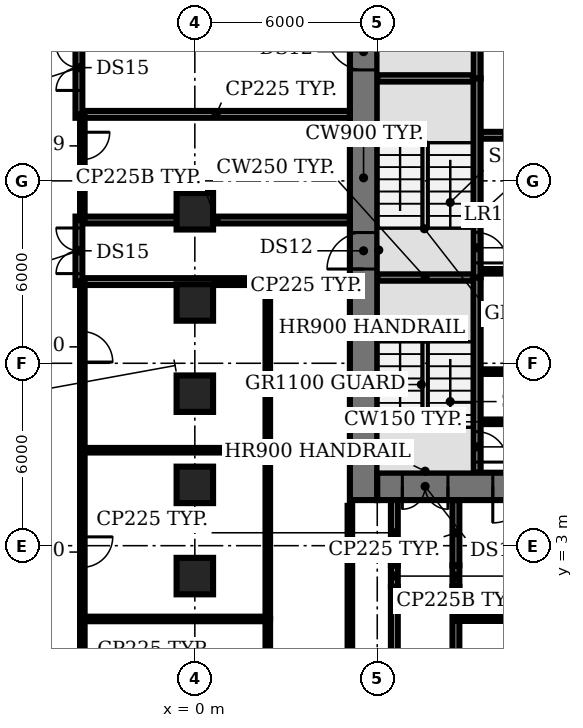
"""IFC4 building model, lengths in metres.
Left out: names, types, materials, properties, quantities, classifications, styles, units other than length and angle.
Written with IfcOpenShell. Run it as: python <this file> out.ifc"""

import sys

from ifc_helpers import new_model, si_unit, direction, frame, frame_2d, origin, origin_2d, place, context, subcontext, project, spatial, rectangle, extrude, element, fill, save


model = new_model("IFC4")
c1 = context("Model", 3, precision=1e-05, world=origin(), true_north=direction((0.0, 1.0)))
c2 = subcontext(c1, "Body", "Model", "MODEL_VIEW")
j1 = project(units=[si_unit("LENGTHUNIT", "METRE"), si_unit("PLANEANGLEUNIT", "RADIAN")], contexts=[c1])
p1 = place(None, origin())
s1 = spatial("IfcSite", under=j1, at=p1, CompositionType="ELEMENT")
p2 = place(p1, origin())
s2 = spatial("IfcBuilding", under=s1, at=p2, CompositionType="ELEMENT")
p3 = place(p2, origin())
s3 = spatial("IfcBuildingStorey", under=s2, at=p3, CompositionType="ELEMENT", Elevation=0.0)
for number, where, z_axis, x_axis in (
    (1, (0.0, 2.0, 0.0), (0.0, 0.0, 1.0), (1.0, 0.0, 0.0)),
    (2, (0.0, 5.0, 0.0), (0.0, 0.0, 1.0), (1.0, 0.0, 0.0)),
    (3, (0.0, 8.0, 0.0), (0.0, 0.0, 1.0), (1.0, 0.0, 0.0)),
    (4, (0.0, 11.0, 0.0), (0.0, 0.0, 1.0), (1.0, 0.0, 0.0)),
    (5, (0.0, 14.0, 0.0), (0.0, 0.0, 1.0), (1.0, 0.0, 0.0)),
):
    element("IfcColumn", number, at=place(p3, frame(where, z_axis=z_axis, x_axis=x_axis)), inside=s3, PredefinedType="COLUMN", context=c2, shape_type="SweptSolid", body=[
        extrude(rectangle(XDim=1.2, YDim=1.2, at=origin_2d()), origin(), (0.0, 0.0, 1.0), 5.65),
    ])
for number, where, z_axis, x_axis in (
    (6, (9.4, 7.075, 0.0), (0.0, 0.0, 1.0), (1.0, 0.0, 0.0)),
    (7, (9.4, 8.725, 0.0), (0.0, 0.0, 1.0), (1.0, 0.0, 0.0)),
    (8, (9.4, 10.375, 0.0), (0.0, 0.0, 1.0), (1.0, 0.0, 0.0)),
):
    element("IfcWall", number, at=place(p3, frame(where, z_axis=z_axis, x_axis=x_axis)), inside=s3, PredefinedType="SHEAR", context=c2, shape_type="SweptSolid", body=[
        extrude(rectangle(XDim=1.05, YDim=0.15, at=frame_2d((0.525, 0.0))), origin(), (0.0, 0.0, 1.0), 5.65),
    ])
p4 = place(p3, frame((6.0, 11.825, 0.0), z_axis=(0.0, 0.0, 1.0), x_axis=(1.0, 0.0, 0.0)))
e9 = element("IfcWall", 9, at=p4, inside=s3, PredefinedType="SHEAR", context=c2, shape_type="SweptSolid", body=[
    extrude(rectangle(XDim=3.15, YDim=0.25, at=frame_2d((1.575, 0.0))), origin(), (0.0, 0.0, 1.0), 5.65),
])
p5 = place(p3, frame((9.4, 12.025, 0.0), z_axis=(0.0, 0.0, 1.0), x_axis=(1.0, 0.0, 0.0)))
e10 = element("IfcWall", 10, at=p5, inside=s3, PredefinedType="SHEAR", context=c2, shape_type="SweptSolid", body=[
    extrude(rectangle(XDim=1.05, YDim=0.15, at=frame_2d((0.525, 0.0))), origin(), (0.0, 0.0, 1.0), 5.65),
])
p6 = place(p3, frame((9.4, 13.7, 0.0), z_axis=(0.0, 0.0, 1.0), x_axis=(1.0, 0.0, 0.0)))
e11 = element("IfcWall", 11, at=p6, inside=s3, PredefinedType="PARTITIONING", context=c2, shape_type="SweptSolid", body=[
    extrude(rectangle(XDim=4.0, YDim=0.225, at=frame_2d((2.0, 0.0))), origin(), (0.0, 0.0, 1.0), 5.65),
])
p7 = place(p3, frame((9.4, 16.5, 0.0), z_axis=(0.0, 0.0, 1.0), x_axis=(1.0, 0.0, 0.0)))
e12 = element("IfcWall", 12, at=p7, inside=s3, PredefinedType="PARTITIONING", context=c2, shape_type="SweptSolid", body=[
    extrude(rectangle(XDim=14.6, YDim=0.225, at=frame_2d((7.3, 0.0))), origin(), (0.0, 0.0, 1.0), 5.65),
])
p8 = place(p7, frame((0.75, 0.0, 0.0)))
e13 = element("IfcOpeningElement", 13, at=p8, cuts=e12, PredefinedType="OPENING", context=c2, shape_type="SweptSolid", body=[
    extrude(rectangle(XDim=1.1, YDim=2.1, at=frame_2d((0.55, 1.05))), frame((0.0, 0.123, 0.0), z_axis=(0.0, -1.0, 0.0), x_axis=(1.0, 0.0, 0.0)), (0.0, 0.0, 1.0), 0.245),
])
p9 = place(p7, frame((3.55, 0.0, 0.0)))
e14 = element("IfcOpeningElement", 14, at=p9, cuts=e12, PredefinedType="OPENING", context=c2, shape_type="SweptSolid", body=[
    extrude(rectangle(XDim=1.1, YDim=2.1, at=frame_2d((0.55, 1.05))), frame((0.0, 0.123, 0.0), z_axis=(0.0, -1.0, 0.0), x_axis=(1.0, 0.0, 0.0)), (0.0, 0.0, 1.0), 0.245),
])
p10 = place(p7, frame((6.35, 0.0, 0.0)))
e15 = element("IfcOpeningElement", 15, at=p10, cuts=e12, PredefinedType="OPENING", context=c2, shape_type="SweptSolid", body=[
    extrude(rectangle(XDim=1.1, YDim=2.1, at=frame_2d((0.55, 1.05))), frame((0.0, 0.123, 0.0), z_axis=(0.0, -1.0, 0.0), x_axis=(1.0, 0.0, 0.0)), (0.0, 0.0, 1.0), 0.245),
])
p11 = place(p7, frame((9.15, 0.0, 0.0)))
e16 = element("IfcOpeningElement", 16, at=p11, cuts=e12, PredefinedType="OPENING", context=c2, shape_type="SweptSolid", body=[
    extrude(rectangle(XDim=1.1, YDim=2.1, at=frame_2d((0.55, 1.05))), frame((0.0, 0.123, 0.0), z_axis=(0.0, -1.0, 0.0), x_axis=(1.0, 0.0, 0.0)), (0.0, 0.0, 1.0), 0.245),
])
p12 = place(p7, frame((12.4, 0.0, 0.0)))
e17 = element("IfcOpeningElement", 17, at=p12, cuts=e12, PredefinedType="OPENING", context=c2, shape_type="SweptSolid", body=[
    extrude(rectangle(XDim=1.0, YDim=2.1, at=frame_2d((0.5, 1.05))), frame((0.0, 0.123, 0.0), z_axis=(0.0, -1.0, 0.0), x_axis=(1.0, 0.0, 0.0)), (0.0, 0.0, 1.0), 0.245),
])
p13 = place(p3, frame((6.0, 18.375, 0.0), z_axis=(0.0, 0.0, 1.0), x_axis=(1.0, 0.0, 0.0)))
e18 = element("IfcWall", 18, at=p13, inside=s3, PredefinedType="SHEAR", context=c2, shape_type="SweptSolid", body=[
    extrude(rectangle(XDim=3.15, YDim=0.25, at=frame_2d((1.575, 0.0))), origin(), (0.0, 0.0, 1.0), 5.65),
])
p14 = place(p3, frame((9.275, 11.825, 0.0), z_axis=(0.0, 0.0, 1.0), x_axis=(0.0, -1.0, 0.0)))
e19 = element("IfcWall", 19, at=p14, inside=s3, PredefinedType="SHEAR", context=c2, shape_type="SweptSolid", body=[
    extrude(rectangle(XDim=6.425, YDim=0.25, at=frame_2d((3.212, 0.0))), origin(), (0.0, 0.0, 1.0), 5.65),
])
p15 = place(p14, frame((5.075, 0.0, 0.0)))
e20 = element("IfcOpeningElement", 20, at=p15, cuts=e19, PredefinedType="OPENING", context=c2, shape_type="SweptSolid", body=[
    extrude(rectangle(XDim=1.0, YDim=2.1, at=frame_2d((0.5, 1.05))), frame((0.0, 0.135, 0.0), z_axis=(0.0, -1.0, 0.0), x_axis=(1.0, 0.0, 0.0)), (0.0, 0.0, 1.0), 0.27),
])
p16 = place(p3, frame((9.275, 18.375, 0.0), z_axis=(0.0, 0.0, 1.0), x_axis=(0.0, -1.0, 0.0)))
e21 = element("IfcWall", 21, at=p16, inside=s3, PredefinedType="SHEAR", context=c2, shape_type="SweptSolid", body=[
    extrude(rectangle(XDim=6.55, YDim=0.25, at=frame_2d((3.275, 0.0))), origin(), (0.0, 0.0, 1.0), 5.65),
])
p17 = place(p16, frame((5.075, 0.0, 0.0)))
e22 = element("IfcOpeningElement", 22, at=p17, cuts=e21, PredefinedType="OPENING", context=c2, shape_type="SweptSolid", body=[
    extrude(rectangle(XDim=1.0, YDim=2.1, at=frame_2d((0.5, 1.05))), frame((0.0, 0.135, 0.0), z_axis=(0.0, -1.0, 0.0), x_axis=(1.0, 0.0, 0.0)), (0.0, 0.0, 1.0), 0.27),
])
p18 = place(p3, frame((9.275, 18.375, 0.0), z_axis=(0.0, 0.0, 1.0), x_axis=(0.0, 1.0, 0.0)))
e23 = element("IfcWall", 23, at=p18, inside=s3, PredefinedType="SHEAR", context=c2, shape_type="SweptSolid", body=[
    extrude(rectangle(XDim=6.425, YDim=0.25, at=frame_2d((3.212, 0.0))), origin(), (0.0, 0.0, 1.0), 5.65),
])
p19 = place(p3, frame((5.55, 4.5, 0.0), z_axis=(0.0, 0.0, 1.0), x_axis=(0.0, 1.0, 0.0)))
e24 = element("IfcWall", 24, at=p19, inside=s3, PredefinedType="SHEAR", context=c2, shape_type="SweptSolid", body=[
    extrude(rectangle(XDim=21.2, YDim=0.9, at=frame_2d((10.6, 0.0))), origin(), (0.0, 0.0, 1.0), 5.65),
])
p20 = place(p19, frame((7.6, 0.0, 0.0)))
e25 = element("IfcOpeningElement", 25, at=p20, cuts=e24, PredefinedType="OPENING", context=c2, shape_type="SweptSolid", body=[
    extrude(rectangle(XDim=1.2, YDim=2.1, at=frame_2d((0.6, 1.05))), frame((0.0, 0.46, 0.0), z_axis=(0.0, -1.0, 0.0), x_axis=(1.0, 0.0, 0.0)), (0.0, 0.0, 1.0), 0.92),
])
p21 = place(p19, frame((14.15, 0.0, 0.0)))
e26 = element("IfcOpeningElement", 26, at=p21, cuts=e24, PredefinedType="OPENING", context=c2, shape_type="SweptSolid", body=[
    extrude(rectangle(XDim=1.2, YDim=2.1, at=frame_2d((0.6, 1.05))), frame((0.0, 0.46, 0.0), z_axis=(0.0, -1.0, 0.0), x_axis=(1.0, 0.0, 0.0)), (0.0, 0.0, 1.0), 0.92),
])
p22 = place(p3, frame((24.0, 4.95, 0.0), z_axis=(0.0, 0.0, 1.0), x_axis=(-1.0, 0.0, 0.0)))
e27 = element("IfcWall", 27, at=p22, inside=s3, PredefinedType="SHEAR", context=c2, shape_type="SweptSolid", body=[
    extrude(rectangle(XDim=18.0, YDim=0.9, at=frame_2d((9.0, 0.0))), origin(), (0.0, 0.0, 1.0), 5.65),
])
p23 = place(p22, frame((15.675, 0.0, 0.0)))
e28 = element("IfcOpeningElement", 28, at=p23, cuts=e27, PredefinedType="OPENING", context=c2, shape_type="SweptSolid", body=[
    extrude(rectangle(XDim=1.5, YDim=2.1, at=frame_2d((0.75, 1.05))), frame((0.0, 0.46, 0.0), z_axis=(0.0, -1.0, 0.0), x_axis=(1.0, 0.0, 0.0)), (0.0, 0.0, 1.0), 0.92),
])
p24 = place(p22, frame((0.825, 0.0, 0.0)))
e29 = element("IfcOpeningElement", 29, at=p24, cuts=e27, PredefinedType="OPENING", context=c2, shape_type="SweptSolid", body=[
    extrude(rectangle(XDim=1.5, YDim=2.1, at=frame_2d((0.75, 1.05))), frame((0.0, 0.46, 0.0), z_axis=(0.0, -1.0, 0.0), x_axis=(1.0, 0.0, 0.0)), (0.0, 0.0, 1.0), 0.92),
])
p25 = place(p22, frame((13.0, 0.0, 0.0)))
e30 = element("IfcOpeningElement", 30, at=p25, cuts=e27, PredefinedType="OPENING", context=c2, shape_type="SweptSolid", body=[
    extrude(rectangle(XDim=1.2, YDim=2.1, at=frame_2d((0.6, 1.05))), frame((0.0, 0.46, 0.0), z_axis=(0.0, -1.0, 0.0), x_axis=(1.0, 0.0, 0.0)), (0.0, 0.0, 1.0), 0.92),
])
p26 = place(p22, frame((4.9, 0.0, 0.0)))
e31 = element("IfcOpeningElement", 31, at=p26, cuts=e27, PredefinedType="OPENING", context=c2, shape_type="SweptSolid", body=[
    extrude(rectangle(XDim=1.0, YDim=2.1, at=frame_2d((0.5, 1.05))), frame((0.0, 0.46, 0.0), z_axis=(0.0, -1.0, 0.0), x_axis=(1.0, 0.0, 0.0)), (0.0, 0.0, 1.0), 0.92),
])
p27 = place(p3, frame((6.562, -3.65, 0.0), z_axis=(0.0, 0.0, 1.0), x_axis=(0.0, 1.0, 0.0)))
e32 = element("IfcWall", 32, at=p27, inside=s3, PredefinedType="PARTITIONING", context=c2, shape_type="SweptSolid", body=[
    extrude(rectangle(XDim=5.3, YDim=0.225, at=frame_2d((2.65, 0.0))), origin(), (0.0, 0.0, 1.0), 5.65),
])
p28 = place(p3, frame((6.562, 1.65, 0.0), z_axis=(0.0, 0.0, 1.0), x_axis=(0.0, 1.0, 0.0)))
e33 = element("IfcWall", 33, at=p28, inside=s3, PredefinedType="PARTITIONING", context=c2, shape_type="SweptSolid", body=[
    extrude(rectangle(XDim=0.7, YDim=0.225, at=frame_2d((0.35, 0.0))), origin(), (0.0, 0.0, 1.0), 4.65),
])
p29 = place(p3, frame((6.562, 2.35, 0.0), z_axis=(0.0, 0.0, 1.0), x_axis=(0.0, 1.0, 0.0)))
e34 = element("IfcWall", 34, at=p29, inside=s3, PredefinedType="PARTITIONING", context=c2, shape_type="SweptSolid", body=[
    extrude(rectangle(XDim=2.15, YDim=0.225, at=frame_2d((1.075, 0.0))), origin(), (0.0, 0.0, 1.0), 5.65),
])
p30 = place(p3, frame((8.587, 1.65, 0.0), z_axis=(0.0, 0.0, 1.0), x_axis=(0.0, -1.0, 0.0)))
e35 = element("IfcWall", 35, at=p30, inside=s3, PredefinedType="PARTITIONING", context=c2, shape_type="SweptSolid", body=[
    extrude(rectangle(XDim=5.3, YDim=0.225, at=frame_2d((2.65, 0.0))), origin(), (0.0, 0.0, 1.0), 5.65),
])
p31 = place(p3, frame((8.587, 2.35, 0.0), z_axis=(0.0, 0.0, 1.0), x_axis=(0.0, -1.0, 0.0)))
e36 = element("IfcWall", 36, at=p31, inside=s3, PredefinedType="PARTITIONING", context=c2, shape_type="SweptSolid", body=[
    extrude(rectangle(XDim=0.7, YDim=0.225, at=frame_2d((0.35, 0.0))), origin(), (0.0, 0.0, 1.0), 4.65),
])
p32 = place(p3, frame((8.587, 4.5, 0.0), z_axis=(0.0, 0.0, 1.0), x_axis=(0.0, -1.0, 0.0)))
e37 = element("IfcWall", 37, at=p32, inside=s3, PredefinedType="PARTITIONING", context=c2, shape_type="SweptSolid", body=[
    extrude(rectangle(XDim=2.15, YDim=0.225, at=frame_2d((1.075, 0.0))), origin(), (0.0, 0.0, 1.0), 5.65),
])
p33 = place(p3, frame((-3.7, 11.688, 0.0), z_axis=(0.0, 0.0, 1.0), x_axis=(1.0, 0.0, 0.0)))
e38 = element("IfcWall", 38, at=p33, inside=s3, PredefinedType="PARTITIONING", context=c2, shape_type="SweptSolid", body=[
    extrude(rectangle(XDim=8.8, YDim=0.225, at=frame_2d((4.4, 0.0))), origin(), (0.0, 0.0, 1.0), 5.65),
])
p34 = place(p3, frame((5.1, 13.712, 0.0), z_axis=(0.0, 0.0, 1.0), x_axis=(-1.0, 0.0, 0.0)))
e39 = element("IfcWall", 39, at=p34, inside=s3, PredefinedType="PARTITIONING", context=c2, shape_type="SweptSolid", body=[
    extrude(rectangle(XDim=8.8, YDim=0.225, at=frame_2d((4.4, 0.0))), origin(), (0.0, 0.0, 1.0), 4.65),
])
p35 = place(p3, frame((-3.812, 11.575, 0.0), z_axis=(0.0, 0.0, 1.0), x_axis=(0.0, 1.0, 0.0)))
e40 = element("IfcWall", 40, at=p35, inside=s3, PredefinedType="PARTITIONING", context=c2, shape_type="SweptSolid", body=[
    extrude(rectangle(XDim=2.25, YDim=0.225, at=frame_2d((1.125, 0.0))), origin(), (0.0, 0.0, 1.0), 5.65),
])
p36 = place(p35, frame((0.375, 0.0, 0.0)))
e41 = element("IfcOpeningElement", 41, at=p36, cuts=e40, PredefinedType="OPENING", context=c2, shape_type="SweptSolid", body=[
    extrude(rectangle(XDim=1.5, YDim=2.1, at=frame_2d((0.75, 1.05))), frame((0.0, 0.123, 0.0), z_axis=(0.0, -1.0, 0.0), x_axis=(1.0, 0.0, 0.0)), (0.0, 0.0, 1.0), 0.245),
])
p37 = place(p3, frame((-3.7, 17.188, 0.0), z_axis=(0.0, 0.0, 1.0), x_axis=(1.0, 0.0, 0.0)))
e42 = element("IfcWall", 42, at=p37, inside=s3, PredefinedType="PARTITIONING", context=c2, shape_type="SweptSolid", body=[
    extrude(rectangle(XDim=8.8, YDim=0.225, at=frame_2d((4.4, 0.0))), origin(), (0.0, 0.0, 1.0), 5.65),
])
p38 = place(p3, frame((-3.812, 17.075, 0.0), z_axis=(0.0, 0.0, 1.0), x_axis=(0.0, 1.0, 0.0)))
e43 = element("IfcWall", 43, at=p38, inside=s3, PredefinedType="PARTITIONING", context=c2, shape_type="SweptSolid", body=[
    extrude(rectangle(XDim=3.3, YDim=0.225, at=frame_2d((1.65, 0.0))), origin(), (0.0, 0.0, 1.0), 5.65),
])
p39 = place(p38, frame((0.9, 0.0, 0.0)))
e44 = element("IfcOpeningElement", 44, at=p39, cuts=e43, PredefinedType="OPENING", context=c2, shape_type="SweptSolid", body=[
    extrude(rectangle(XDim=1.5, YDim=2.1, at=frame_2d((0.75, 1.05))), frame((0.0, 0.123, 0.0), z_axis=(0.0, -1.0, 0.0), x_axis=(1.0, 0.0, 0.0)), (0.0, 0.0, 1.0), 0.245),
])
p40 = place(p3, frame((-3.7, -2.05, 0.0), z_axis=(0.0, 0.0, 1.0), x_axis=(0.0, 1.0, 0.0)))
e45 = element("IfcWall", 45, at=p40, inside=s3, PredefinedType="PARTITIONING", context=c2, shape_type="SweptSolid", body=[
    extrude(rectangle(XDim=2.64, YDim=0.15, at=frame_2d((1.32, 0.0))), origin(), (0.0, 0.0, 1.0), 4.53),
])
p41 = place(p3, frame((-3.7, 0.59, 0.0), z_axis=(0.0, 0.0, 1.0), x_axis=(1.0, 0.0, 0.0)))
e46 = element("IfcWall", 46, at=p41, inside=s3, PredefinedType="PARTITIONING", context=c2, shape_type="SweptSolid", body=[
    extrude(rectangle(XDim=6.1, YDim=0.15, at=frame_2d((3.05, 0.0))), origin(), (0.0, 0.0, 1.0), 4.53),
])
p42 = place(p3, frame((-3.7, 6.14, 0.0), z_axis=(0.0, 0.0, 1.0), x_axis=(0.0, -1.0, 0.0)))
e47 = element("IfcWall", 47, at=p42, inside=s3, PredefinedType="PARTITIONING", context=c2, shape_type="SweptSolid", body=[
    extrude(rectangle(XDim=5.55, YDim=0.15, at=frame_2d((2.775, 0.0))), origin(), (0.0, 0.0, 1.0), 4.53),
])
p43 = place(p42, frame((2.85, 0.0, 0.0)))
e48 = element("IfcOpeningElement", 48, at=p43, cuts=e47, PredefinedType="OPENING", context=c2, shape_type="SweptSolid", body=[
    extrude(rectangle(XDim=1.0, YDim=2.1, at=frame_2d((0.5, 1.05))), frame((0.0, 0.085, 0.0), z_axis=(0.0, -1.0, 0.0), x_axis=(1.0, 0.0, 0.0)), (0.0, 0.0, 1.0), 0.17),
])
p44 = place(p3, frame((-3.7, 6.14, 0.0), z_axis=(0.0, 0.0, 1.0), x_axis=(1.0, 0.0, 0.0)))
e49 = element("IfcWall", 49, at=p44, inside=s3, PredefinedType="PARTITIONING", context=c2, shape_type="SweptSolid", body=[
    extrude(rectangle(XDim=6.1, YDim=0.15, at=frame_2d((3.05, 0.0))), origin(), (0.0, 0.0, 1.0), 4.53),
])
p45 = place(p3, frame((-3.7, 11.7, 0.0), z_axis=(0.0, 0.0, 1.0), x_axis=(0.0, -1.0, 0.0)))
e50 = element("IfcWall", 50, at=p45, inside=s3, PredefinedType="PARTITIONING", context=c2, shape_type="SweptSolid", body=[
    extrude(rectangle(XDim=5.56, YDim=0.15, at=frame_2d((2.78, 0.0))), origin(), (0.0, 0.0, 1.0), 4.53),
])
p46 = place(p45, frame((1.66, 0.0, 0.0)))
e51 = element("IfcOpeningElement", 51, at=p46, cuts=e50, PredefinedType="OPENING", context=c2, shape_type="SweptSolid", body=[
    extrude(rectangle(XDim=1.0, YDim=2.1, at=frame_2d((0.5, 1.05))), frame((0.0, 0.085, 0.0), z_axis=(0.0, -1.0, 0.0), x_axis=(1.0, 0.0, 0.0)), (0.0, 0.0, 1.0), 0.17),
])
p47 = place(p3, frame((-3.7, 17.2, 0.0), z_axis=(0.0, 0.0, 1.0), x_axis=(0.0, -1.0, 0.0)))
e52 = element("IfcWall", 52, at=p47, inside=s3, PredefinedType="PARTITIONING", context=c2, shape_type="SweptSolid", body=[
    extrude(rectangle(XDim=3.5, YDim=0.15, at=frame_2d((1.75, 0.0))), origin(), (0.0, 0.0, 1.0), 4.53),
])
p48 = place(p47, frame((0.6, 0.0, 0.0)))
e53 = element("IfcOpeningElement", 53, at=p48, cuts=e52, PredefinedType="OPENING", context=c2, shape_type="SweptSolid", body=[
    extrude(rectangle(XDim=0.9, YDim=2.1, at=frame_2d((0.45, 1.05))), frame((0.0, 0.085, 0.0), z_axis=(0.0, -1.0, 0.0), x_axis=(1.0, 0.0, 0.0)), (0.0, 0.0, 1.0), 0.17),
])
p49 = place(p3, frame((2.4, -4.5, 0.0), z_axis=(0.0, 0.0, 1.0), x_axis=(0.0, 1.0, 0.0)))
e54 = element("IfcWall", 54, at=p49, inside=s3, PredefinedType="PARTITIONING", context=c2, shape_type="SweptSolid", body=[
    extrude(rectangle(XDim=5.09, YDim=0.15, at=frame_2d((2.545, 0.0))), origin(), (0.0, 0.0, 1.0), 4.53),
])
p50 = place(p49, frame((2.09, 0.0, 0.0)))
e55 = element("IfcOpeningElement", 55, at=p50, cuts=e54, PredefinedType="OPENING", context=c2, shape_type="SweptSolid", body=[
    extrude(rectangle(XDim=1.0, YDim=2.1, at=frame_2d((0.5, 1.05))), frame((0.0, 0.085, 0.0), z_axis=(0.0, -1.0, 0.0), x_axis=(1.0, 0.0, 0.0)), (0.0, 0.0, 1.0), 0.17),
])
p51 = place(p3, frame((2.4, 0.6, 0.0), z_axis=(0.0, 0.0, 1.0), x_axis=(0.0, 1.0, 0.0)))
e56 = element("IfcWall", 56, at=p51, inside=s3, PredefinedType="PARTITIONING", context=c2, shape_type="SweptSolid", body=[
    extrude(rectangle(XDim=11.1, YDim=0.15, at=frame_2d((5.55, 0.0))), origin(), (0.0, 0.0, 1.0), 4.53),
])
p52 = place(p3, frame((5.1, -4.5, 0.0), z_axis=(0.0, 0.0, 1.0), x_axis=(0.0, 1.0, 0.0)))
e57 = element("IfcWall", 57, at=p52, inside=s3, PredefinedType="PARTITIONING", context=c2, shape_type="SweptSolid", body=[
    extrude(rectangle(XDim=8.81, YDim=0.15, at=frame_2d((4.405, 0.0))), origin(), (0.0, 0.0, 1.0), 4.53),
])
p53 = place(p3, frame((17.5, 0.6, 0.0), z_axis=(0.0, 0.0, 1.0), x_axis=(-1.0, 0.0, 0.0)))
e58 = element("IfcWall", 58, at=p53, inside=s3, PredefinedType="PARTITIONING", context=c2, shape_type="SweptSolid", body=[
    extrude(rectangle(XDim=8.93, YDim=0.15, at=frame_2d((4.465, 0.0))), origin(), (0.0, 0.0, 1.0), 4.53),
])
p54 = place(p53, frame((3.93, 0.0, 0.0)))
e59 = element("IfcOpeningElement", 59, at=p54, cuts=e58, PredefinedType="OPENING", context=c2, shape_type="SweptSolid", body=[
    extrude(rectangle(XDim=0.9, YDim=2.1, at=frame_2d((0.45, 1.05))), frame((0.0, 0.085, 0.0), z_axis=(0.0, -1.0, 0.0), x_axis=(1.0, 0.0, 0.0)), (0.0, 0.0, 1.0), 0.17),
])
p55 = place(p15, origin())
e60 = element("IfcDoor", 60, at=p55, inside=s3, OperationType="SINGLE_SWING_RIGHT", PredefinedType="DOOR", context=c2, shape_type="SweptSolid", body=[
    extrude(rectangle(XDim=1.0, YDim=2.1, at=frame_2d((0.5, 1.05))), frame((0.0, 0.025, 0.0), z_axis=(0.0, -1.0, 0.0), x_axis=(1.0, 0.0, 0.0)), (0.0, 0.0, 1.0), 0.05),
])
fill(e20, e60)
p56 = place(p17, origin())
e61 = element("IfcDoor", 61, at=p56, inside=s3, OperationType="SINGLE_SWING_RIGHT", PredefinedType="DOOR", context=c2, shape_type="SweptSolid", body=[
    extrude(rectangle(XDim=1.0, YDim=2.1, at=frame_2d((0.5, 1.05))), frame((0.0, 0.025, 0.0), z_axis=(0.0, -1.0, 0.0), x_axis=(1.0, 0.0, 0.0)), (0.0, 0.0, 1.0), 0.05),
])
fill(e22, e61)
p57 = place(p20, origin())
e62 = element("IfcDoor", 62, at=p57, inside=s3, OperationType="SINGLE_SWING_LEFT", PredefinedType="DOOR", context=c2, shape_type="SweptSolid", body=[
    extrude(rectangle(XDim=1.2, YDim=2.1, at=frame_2d((0.6, 1.05))), frame((0.0, 0.025, 0.0), z_axis=(0.0, -1.0, 0.0), x_axis=(1.0, 0.0, 0.0)), (0.0, 0.0, 1.0), 0.05),
])
fill(e25, e62)
p58 = place(p21, origin())
e63 = element("IfcDoor", 63, at=p58, inside=s3, OperationType="SINGLE_SWING_RIGHT", PredefinedType="DOOR", context=c2, shape_type="SweptSolid", body=[
    extrude(rectangle(XDim=1.2, YDim=2.1, at=frame_2d((0.6, 1.05))), frame((0.0, 0.025, 0.0), z_axis=(0.0, -1.0, 0.0), x_axis=(1.0, 0.0, 0.0)), (0.0, 0.0, 1.0), 0.05),
])
fill(e26, e63)
p59 = place(p23, origin())
e64 = element("IfcDoor", 64, at=p59, inside=s3, OperationType="DOUBLE_DOOR_SINGLE_SWING", PredefinedType="DOOR", context=c2, shape_type="SweptSolid", body=[
    extrude(rectangle(XDim=1.5, YDim=2.1, at=frame_2d((0.75, 1.05))), frame((0.0, 0.025, 0.0), z_axis=(0.0, -1.0, 0.0), x_axis=(1.0, 0.0, 0.0)), (0.0, 0.0, 1.0), 0.05),
])
fill(e28, e64)
p60 = place(p25, origin())
e65 = element("IfcDoor", 65, at=p60, inside=s3, OperationType="SINGLE_SWING_RIGHT", PredefinedType="DOOR", context=c2, shape_type="SweptSolid", body=[
    extrude(rectangle(XDim=1.2, YDim=2.1, at=frame_2d((0.6, 1.05))), frame((0.0, 0.025, 0.0), z_axis=(0.0, -1.0, 0.0), x_axis=(1.0, 0.0, 0.0)), (0.0, 0.0, 1.0), 0.05),
])
fill(e30, e65)
p61 = place(p36, origin())
e66 = element("IfcDoor", 66, at=p61, inside=s3, OperationType="DOUBLE_DOOR_SINGLE_SWING", PredefinedType="DOOR", context=c2, shape_type="SweptSolid", body=[
    extrude(rectangle(XDim=1.5, YDim=2.1, at=frame_2d((0.75, 1.05))), frame((0.0, 0.025, 0.0), z_axis=(0.0, -1.0, 0.0), x_axis=(1.0, 0.0, 0.0)), (0.0, 0.0, 1.0), 0.05),
])
fill(e41, e66)
p62 = place(p39, origin())
e67 = element("IfcDoor", 67, at=p62, inside=s3, OperationType="DOUBLE_DOOR_SINGLE_SWING", PredefinedType="DOOR", context=c2, shape_type="SweptSolid", body=[
    extrude(rectangle(XDim=1.5, YDim=2.1, at=frame_2d((0.75, 1.05))), frame((0.0, 0.025, 0.0), z_axis=(0.0, -1.0, 0.0), x_axis=(1.0, 0.0, 0.0)), (0.0, 0.0, 1.0), 0.05),
])
fill(e44, e67)
p63 = place(p43, origin())
e68 = element("IfcDoor", 68, at=p63, inside=s3, OperationType="SINGLE_SWING_LEFT", PredefinedType="DOOR", context=c2, shape_type="SweptSolid", body=[
    extrude(rectangle(XDim=1.0, YDim=2.1, at=frame_2d((0.5, 1.05))), frame((0.0, 0.025, 0.0), z_axis=(0.0, -1.0, 0.0), x_axis=(1.0, 0.0, 0.0)), (0.0, 0.0, 1.0), 0.05),
])
fill(e48, e68)
p64 = place(p46, origin())
e69 = element("IfcDoor", 69, at=p64, inside=s3, OperationType="SINGLE_SWING_RIGHT", PredefinedType="DOOR", context=c2, shape_type="SweptSolid", body=[
    extrude(rectangle(XDim=1.0, YDim=2.1, at=frame_2d((0.5, 1.05))), frame((0.0, 0.025, 0.0), z_axis=(0.0, -1.0, 0.0), x_axis=(1.0, 0.0, 0.0)), (0.0, 0.0, 1.0), 0.05),
])
fill(e51, e69)
p65 = place(p48, origin())
e70 = element("IfcDoor", 70, at=p65, inside=s3, OperationType="SINGLE_SWING_LEFT", PredefinedType="DOOR", context=c2, shape_type="SweptSolid", body=[
    extrude(rectangle(XDim=0.9, YDim=2.1, at=frame_2d((0.45, 1.05))), frame((0.0, 0.025, 0.0), z_axis=(0.0, -1.0, 0.0), x_axis=(1.0, 0.0, 0.0)), (0.0, 0.0, 1.0), 0.05),
])
fill(e53, e70)
save(model, sys.argv[1])
